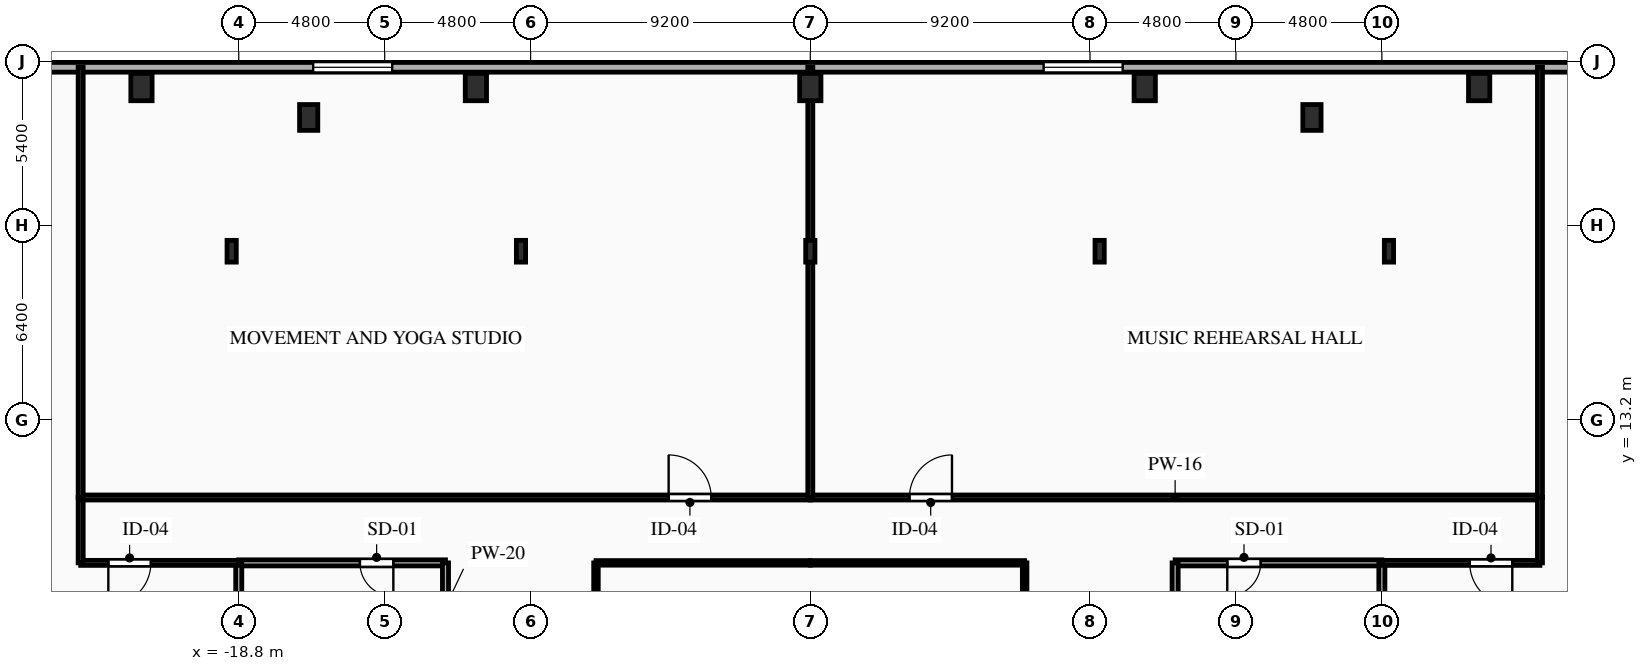
"""IFC4 building model, lengths in metres.
Left out: names, types, materials, properties, quantities, classifications, styles, units other than length and angle.
Written with IfcOpenShell. Run it as: python <this file> out.ifc"""

import sys

from ifc_helpers import new_model, si_unit, direction, frame, frame_2d, origin, origin_2d, place, context, subcontext, project, spatial, rectangle, i_section, extrude, element, fill, save


model = new_model("IFC4")
c1 = context("Model", 3, precision=1e-05, world=origin(), true_north=direction((0.0, 1.0)))
c2 = subcontext(c1, "Body", "Model", "MODEL_VIEW")
j1 = project(units=[si_unit("LENGTHUNIT", "METRE"), si_unit("PLANEANGLEUNIT", "RADIAN")], contexts=[c1])
p1 = place(None, origin())
s1 = spatial("IfcSite", under=j1, at=p1, CompositionType="ELEMENT")
p2 = place(p1, origin())
s2 = spatial("IfcBuilding", under=s1, at=p2, CompositionType="ELEMENT")
p3 = place(p2, frame((0.0, 0.0, 13.5)))
s3 = spatial("IfcBuildingStorey", under=s2, at=p3, CompositionType="ELEMENT", Elevation=13.5)
for number, where, z_axis, x_axis in (
    (1, (-22.0, 24.15, 0.0), (0.0, 0.0, 1.0), (1.0, 0.0, 0.0)),
    (2, (-11.0, 24.15, 0.0), (0.0, 0.0, 1.0), (1.0, 0.0, 0.0)),
    (3, (0.0, 24.15, 0.0), (0.0, 0.0, 1.0), (1.0, 0.0, 0.0)),
    (4, (11.0, 24.15, 0.0), (0.0, 0.0, 1.0), (1.0, 0.0, 0.0)),
    (5, (22.0, 24.15, 0.0), (0.0, 0.0, 1.0), (1.0, 0.0, 0.0)),
):
    element("IfcColumn", number, at=place(p3, frame(where, z_axis=z_axis, x_axis=x_axis)), inside=s3, PredefinedType="COLUMN", context=c2, shape_type="SweptSolid", body=[
        extrude(rectangle(XDim=0.7, YDim=0.9, at=origin_2d()), origin(), (0.0, 0.0, 1.0), 4.5),
    ])
for number, where, z_axis, x_axis in (
    (6, (-16.5, 23.15, 0.0), (0.0, 0.0, 1.0), (1.0, 0.0, 0.0)),
    (7, (16.5, 23.15, 0.0), (0.0, 0.0, 1.0), (1.0, 0.0, 0.0)),
):
    element("IfcColumn", number, at=place(p3, frame(where, z_axis=z_axis, x_axis=x_axis)), inside=s3, PredefinedType="PILASTER", context=c2, shape_type="SweptSolid", body=[
        extrude(rectangle(XDim=0.6, YDim=0.85, at=origin_2d()), origin(), (0.0, 0.0, 1.0), 4.5),
    ])
for number, where, z_axis, x_axis in (
    (8, (19.033, 18.75, 0.0), (0.0, 0.0, 1.0), (1.0, 0.0, 0.0)),
    (9, (9.517, 18.75, 0.0), (0.0, 0.0, 1.0), (1.0, 0.0, 0.0)),
    (10, (0.0, 18.75, 0.0), (0.0, 0.0, 1.0), (1.0, 0.0, 0.0)),
    (11, (-9.517, 18.75, 0.0), (0.0, 0.0, 1.0), (1.0, 0.0, 0.0)),
    (12, (-19.033, 18.75, 0.0), (0.0, 0.0, 1.0), (1.0, 0.0, 0.0)),
):
    element("IfcColumn", number, at=place(p3, frame(where, z_axis=z_axis, x_axis=x_axis)), inside=s3, PredefinedType="COLUMN", context=c2, shape_type="SweptSolid", body=[
        extrude(i_section(OverallWidth=0.304, OverallDepth=0.716, WebThickness=0.021, FlangeThickness=0.04, FilletRadius=0.027, at=origin_2d()), origin(), (0.0, 0.0, 1.0), 4.5),
    ])
p4 = place(p3, frame((-36.8, 24.8, 0.0), z_axis=(0.0, 0.0, 1.0), x_axis=(1.0, 0.0, 0.0)))
e13 = element("IfcWall", 13, at=p4, inside=s3, PredefinedType="SOLIDWALL", context=c2, shape_type="SweptSolid", body=[
    extrude(rectangle(XDim=73.6, YDim=0.32, at=frame_2d((36.8, 0.0))), origin(), (0.0, 0.0, 1.0), 4.17),
])
p5 = place(p4, frame((5.347, 0.0, 0.85)))
e14 = element("IfcOpeningElement", 14, at=p5, cuts=e13, PredefinedType="OPENING", context=c2, shape_type="SweptSolid", body=[
    extrude(rectangle(XDim=2.6, YDim=2.4, at=frame_2d((1.3, 1.2))), frame((0.0, 0.17, 0.0), z_axis=(0.0, -1.0, 0.0), x_axis=(1.0, 0.0, 0.0)), (0.0, 0.0, 1.0), 0.34),
])
p6 = place(p4, frame((20.448, 0.0, 0.85)))
e15 = element("IfcOpeningElement", 15, at=p6, cuts=e13, PredefinedType="OPENING", context=c2, shape_type="SweptSolid", body=[
    extrude(rectangle(XDim=2.6, YDim=2.4, at=frame_2d((1.3, 1.2))), frame((0.0, 0.17, 0.0), z_axis=(0.0, -1.0, 0.0), x_axis=(1.0, 0.0, 0.0)), (0.0, 0.0, 1.0), 0.34),
])
p7 = place(p4, frame((44.474, 0.0, 0.85)))
e16 = element("IfcOpeningElement", 16, at=p7, cuts=e13, PredefinedType="OPENING", context=c2, shape_type="SweptSolid", body=[
    extrude(rectangle(XDim=2.6, YDim=2.4, at=frame_2d((1.3, 1.2))), frame((0.0, 0.17, 0.0), z_axis=(0.0, -1.0, 0.0), x_axis=(1.0, 0.0, 0.0)), (0.0, 0.0, 1.0), 0.34),
])
p8 = place(p4, frame((65.733, 0.0, 0.85)))
e17 = element("IfcOpeningElement", 17, at=p8, cuts=e13, PredefinedType="OPENING", context=c2, shape_type="SweptSolid", body=[
    extrude(rectangle(XDim=2.6, YDim=2.4, at=frame_2d((1.3, 1.2))), frame((0.0, 0.17, 0.0), z_axis=(0.0, -1.0, 0.0), x_axis=(1.0, 0.0, 0.0)), (0.0, 0.0, 1.0), 0.34),
])
p9 = place(p3, frame((-12.0, 8.5, 0.0), z_axis=(0.0, 0.0, 1.0), x_axis=(-1.0, 0.0, 0.0)))
e18 = element("IfcWall", 18, at=p9, inside=s3, PredefinedType="PARTITIONING", context=c2, shape_type="SweptSolid", body=[
    extrude(rectangle(XDim=6.8, YDim=0.2, at=frame_2d((3.4, 0.0))), origin(), (0.0, 0.0, 1.0), 4.17),
])
p10 = place(p9, frame((1.715, 0.0, 0.0)))
e19 = element("IfcOpeningElement", 19, at=p10, cuts=e18, PredefinedType="OPENING", context=c2, shape_type="SweptSolid", body=[
    extrude(rectangle(XDim=1.1, YDim=2.15, at=frame_2d((0.55, 1.075))), frame((0.0, 0.11, 0.0), z_axis=(0.0, -1.0, 0.0), x_axis=(1.0, 0.0, 0.0)), (0.0, 0.0, 1.0), 0.22),
])
p11 = place(p3, frame((-12.0, 5.6, 0.0), z_axis=(0.0, 0.0, 1.0), x_axis=(0.0, 1.0, 0.0)))
e20 = element("IfcWall", 20, at=p11, inside=s3, PredefinedType="PARTITIONING", context=c2, shape_type="SweptSolid", body=[
    extrude(rectangle(XDim=2.9, YDim=0.2, at=frame_2d((1.45, 0.0))), origin(), (0.0, 0.0, 1.0), 4.17),
])
p12 = place(p3, frame((-18.8, 8.5, 0.0), z_axis=(0.0, 0.0, 1.0), x_axis=(0.0, -1.0, 0.0)))
e21 = element("IfcWall", 21, at=p12, inside=s3, PredefinedType="PARTITIONING", context=c2, shape_type="SweptSolid", body=[
    extrude(rectangle(XDim=2.9, YDim=0.2, at=frame_2d((1.45, 0.0))), origin(), (0.0, 0.0, 1.0), 3.655),
])
p13 = place(p3, frame((18.8, 8.5, 0.0), z_axis=(0.0, 0.0, 1.0), x_axis=(-1.0, 0.0, 0.0)))
e22 = element("IfcWall", 22, at=p13, inside=s3, PredefinedType="PARTITIONING", context=c2, shape_type="SweptSolid", body=[
    extrude(rectangle(XDim=6.8, YDim=0.2, at=frame_2d((3.4, 0.0))), origin(), (0.0, 0.0, 1.0), 4.17),
])
p14 = place(p13, frame((3.985, 0.0, 0.0)))
e23 = element("IfcOpeningElement", 23, at=p14, cuts=e22, PredefinedType="OPENING", context=c2, shape_type="SweptSolid", body=[
    extrude(rectangle(XDim=1.1, YDim=2.15, at=frame_2d((0.55, 1.075))), frame((0.0, 0.11, 0.0), z_axis=(0.0, -1.0, 0.0), x_axis=(1.0, 0.0, 0.0)), (0.0, 0.0, 1.0), 0.22),
])
p15 = place(p3, frame((12.0, 8.5, 0.0), z_axis=(0.0, 0.0, 1.0), x_axis=(0.0, -1.0, 0.0)))
e24 = element("IfcWall", 24, at=p15, inside=s3, PredefinedType="PARTITIONING", context=c2, shape_type="SweptSolid", body=[
    extrude(rectangle(XDim=2.9, YDim=0.2, at=frame_2d((1.45, 0.0))), origin(), (0.0, 0.0, 1.0), 4.17),
])
p16 = place(p3, frame((18.8, 5.6, 0.0), z_axis=(0.0, 0.0, 1.0), x_axis=(0.0, 1.0, 0.0)))
e25 = element("IfcWall", 25, at=p16, inside=s3, PredefinedType="PARTITIONING", context=c2, shape_type="SweptSolid", body=[
    extrude(rectangle(XDim=2.9, YDim=0.2, at=frame_2d((1.45, 0.0))), origin(), (0.0, 0.0, 1.0), 3.655),
])
p17 = place(p3, frame((-18.8, 8.5, 0.0), z_axis=(0.0, 0.0, 1.0), x_axis=(-1.0, 0.0, 0.0)))
e26 = element("IfcWall", 26, at=p17, inside=s3, PredefinedType="PARTITIONING", context=c2, shape_type="SweptSolid", body=[
    extrude(rectangle(XDim=5.2, YDim=0.165, at=frame_2d((2.6, 0.0))), origin(), (0.0, 0.0, 1.0), 4.17),
])
p18 = place(p17, frame((2.89, 0.0, 0.0)))
e27 = element("IfcOpeningElement", 27, at=p18, cuts=e26, PredefinedType="OPENING", context=c2, shape_type="SweptSolid", body=[
    extrude(rectangle(XDim=1.4, YDim=2.3, at=frame_2d((0.7, 1.15))), frame((0.0, 0.093, 0.0), z_axis=(0.0, -1.0, 0.0), x_axis=(1.0, 0.0, 0.0)), (0.0, 0.0, 1.0), 0.185),
])
p19 = place(p3, frame((-24.0, 8.5, 0.0), z_axis=(0.0, 0.0, 1.0), x_axis=(0.0, 1.0, 0.0)))
e28 = element("IfcWall", 28, at=p19, inside=s3, PredefinedType="PARTITIONING", context=c2, shape_type="SweptSolid", body=[
    extrude(rectangle(XDim=2.15, YDim=0.165, at=frame_2d((1.075, 0.0))), origin(), (0.0, 0.0, 1.0), 4.17),
])
p20 = place(p3, frame((-24.0, 10.65, 0.0), z_axis=(0.0, 0.0, 1.0), x_axis=(1.0, 0.0, 0.0)))
e29 = element("IfcWall", 29, at=p20, inside=s3, PredefinedType="PARTITIONING", context=c2, shape_type="SweptSolid", body=[
    extrude(rectangle(XDim=24.0, YDim=0.165, at=frame_2d((12.0, 0.0))), origin(), (0.0, 0.0, 1.0), 4.17),
])
p21 = place(p20, frame((19.34, 0.0, 0.0)))
e30 = element("IfcOpeningElement", 30, at=p21, cuts=e29, PredefinedType="OPENING", context=c2, shape_type="SweptSolid", body=[
    extrude(rectangle(XDim=1.4, YDim=2.3, at=frame_2d((0.7, 1.15))), frame((0.0, 0.093, 0.0), z_axis=(0.0, -1.0, 0.0), x_axis=(1.0, 0.0, 0.0)), (0.0, 0.0, 1.0), 0.185),
])
p22 = place(p3, frame((0.0, 8.5, 0.0), z_axis=(0.0, 0.0, 1.0), x_axis=(-1.0, 0.0, 0.0)))
e31 = element("IfcWall", 31, at=p22, inside=s3, PredefinedType="PARTITIONING", context=c2, shape_type="SweptSolid", body=[
    extrude(rectangle(XDim=7.05, YDim=0.15, at=frame_2d((3.525, 0.0))), origin(), (0.0, 0.0, 1.0), 4.17),
])
p23 = place(p3, frame((0.0, 10.65, 0.0), z_axis=(0.0, 0.0, 1.0), x_axis=(1.0, 0.0, 0.0)))
e32 = element("IfcWall", 32, at=p23, inside=s3, PredefinedType="PARTITIONING", context=c2, shape_type="SweptSolid", body=[
    extrude(rectangle(XDim=24.0, YDim=0.165, at=frame_2d((12.0, 0.0))), origin(), (0.0, 0.0, 1.0), 4.17),
])
p24 = place(p23, frame((3.26, 0.0, 0.0)))
e33 = element("IfcOpeningElement", 33, at=p24, cuts=e32, PredefinedType="OPENING", context=c2, shape_type="SweptSolid", body=[
    extrude(rectangle(XDim=1.4, YDim=2.3, at=frame_2d((0.7, 1.15))), frame((0.0, 0.093, 0.0), z_axis=(0.0, -1.0, 0.0), x_axis=(1.0, 0.0, 0.0)), (0.0, 0.0, 1.0), 0.185),
])
p25 = place(p3, frame((7.05, 8.5, 0.0), z_axis=(0.0, 0.0, 1.0), x_axis=(-1.0, 0.0, 0.0)))
e34 = element("IfcWall", 34, at=p25, inside=s3, PredefinedType="PARTITIONING", context=c2, shape_type="SweptSolid", body=[
    extrude(rectangle(XDim=7.05, YDim=0.15, at=frame_2d((3.525, 0.0))), origin(), (0.0, 0.0, 1.0), 4.17),
])
p26 = place(p3, frame((24.0, 8.5, 0.0), z_axis=(0.0, 0.0, 1.0), x_axis=(-1.0, 0.0, 0.0)))
e35 = element("IfcWall", 35, at=p26, inside=s3, PredefinedType="PARTITIONING", context=c2, shape_type="SweptSolid", body=[
    extrude(rectangle(XDim=5.2, YDim=0.165, at=frame_2d((2.6, 0.0))), origin(), (0.0, 0.0, 1.0), 4.17),
])
p27 = place(p26, frame((0.91, 0.0, 0.0)))
e36 = element("IfcOpeningElement", 36, at=p27, cuts=e35, PredefinedType="OPENING", context=c2, shape_type="SweptSolid", body=[
    extrude(rectangle(XDim=1.4, YDim=2.3, at=frame_2d((0.7, 1.15))), frame((0.0, 0.093, 0.0), z_axis=(0.0, -1.0, 0.0), x_axis=(1.0, 0.0, 0.0)), (0.0, 0.0, 1.0), 0.185),
])
p28 = place(p3, frame((24.0, 10.65, 0.0), z_axis=(0.0, 0.0, 1.0), x_axis=(0.0, -1.0, 0.0)))
e37 = element("IfcWall", 37, at=p28, inside=s3, PredefinedType="PARTITIONING", context=c2, shape_type="SweptSolid", body=[
    extrude(rectangle(XDim=2.15, YDim=0.165, at=frame_2d((1.075, 0.0))), origin(), (0.0, 0.0, 1.0), 4.17),
])
p29 = place(p3, frame((-7.05, 8.5, 0.0), z_axis=(0.0, 0.0, 1.0), x_axis=(0.0, -1.0, 0.0)))
e38 = element("IfcWall", 38, at=p29, inside=s3, PredefinedType="PARTITIONING", context=c2, shape_type="SweptSolid", body=[
    extrude(rectangle(XDim=14.1, YDim=0.15, at=frame_2d((7.05, 0.0))), origin(), (0.0, 0.0, 1.0), 4.17),
])
p30 = place(p29, frame((7.792, 0.0, 0.0)))
e39 = element("IfcOpeningElement", 39, at=p30, cuts=e38, PredefinedType="OPENING", context=c2, shape_type="SweptSolid", body=[
    extrude(rectangle(XDim=1.4, YDim=2.3, at=frame_2d((0.7, 1.15))), frame((0.0, 0.085, 0.0), z_axis=(0.0, -1.0, 0.0), x_axis=(1.0, 0.0, 0.0)), (0.0, 0.0, 1.0), 0.17),
])
p31 = place(p3, frame((7.05, -5.6, 0.0), z_axis=(0.0, 0.0, 1.0), x_axis=(0.0, 1.0, 0.0)))
e40 = element("IfcWall", 40, at=p31, inside=s3, PredefinedType="PARTITIONING", context=c2, shape_type="SweptSolid", body=[
    extrude(rectangle(XDim=14.1, YDim=0.15, at=frame_2d((7.05, 0.0))), origin(), (0.0, 0.0, 1.0), 4.17),
])
p32 = place(p3, frame((-24.0, 24.8, 0.0), z_axis=(0.0, 0.0, 1.0), x_axis=(0.0, -1.0, 0.0)))
e41 = element("IfcWall", 41, at=p32, inside=s3, PredefinedType="PARTITIONING", context=c2, shape_type="SweptSolid", body=[
    extrude(rectangle(XDim=14.15, YDim=0.165, at=frame_2d((7.075, 0.0))), origin(), (0.0, 0.0, 1.0), 4.17),
])
p33 = place(p3, frame((0.0, 24.8, 0.0), z_axis=(0.0, 0.0, 1.0), x_axis=(0.0, -1.0, 0.0)))
e42 = element("IfcWall", 42, at=p33, inside=s3, PredefinedType="PARTITIONING", context=c2, shape_type="SweptSolid", body=[
    extrude(rectangle(XDim=14.15, YDim=0.165, at=frame_2d((7.075, 0.0))), origin(), (0.0, 0.0, 1.0), 3.555),
])
p34 = place(p3, frame((24.0, 24.8, 0.0), z_axis=(0.0, 0.0, 1.0), x_axis=(0.0, -1.0, 0.0)))
e43 = element("IfcWall", 43, at=p34, inside=s3, PredefinedType="PARTITIONING", context=c2, shape_type="SweptSolid", body=[
    extrude(rectangle(XDim=14.15, YDim=0.165, at=frame_2d((7.075, 0.0))), origin(), (0.0, 0.0, 1.0), 4.17),
])
p35 = place(p6, origin())
e44 = element("IfcWindow", 44, at=p35, inside=s3, PartitioningType="SINGLE_PANEL", PredefinedType="WINDOW", context=c2, shape_type="SweptSolid", body=[
    extrude(rectangle(XDim=2.6, YDim=2.4, at=frame_2d((1.3, 1.2))), frame((0.0, 0.03, 0.0), z_axis=(0.0, -1.0, 0.0), x_axis=(1.0, 0.0, 0.0)), (0.0, 0.0, 1.0), 0.06),
])
fill(e15, e44)
p36 = place(p7, origin())
e45 = element("IfcWindow", 45, at=p36, inside=s3, PartitioningType="SINGLE_PANEL", PredefinedType="WINDOW", context=c2, shape_type="SweptSolid", body=[
    extrude(rectangle(XDim=2.6, YDim=2.4, at=frame_2d((1.3, 1.2))), frame((0.0, 0.03, 0.0), z_axis=(0.0, -1.0, 0.0), x_axis=(1.0, 0.0, 0.0)), (0.0, 0.0, 1.0), 0.06),
])
fill(e16, e45)
p37 = place(p10, origin())
e46 = element("IfcDoor", 46, at=p37, inside=s3, OperationType="SINGLE_SWING_LEFT", PredefinedType="DOOR", context=c2, shape_type="SweptSolid", body=[
    extrude(rectangle(XDim=1.1, YDim=2.15, at=frame_2d((0.55, 1.075))), frame((0.0, 0.025, 0.0), z_axis=(0.0, -1.0, 0.0), x_axis=(1.0, 0.0, 0.0)), (0.0, 0.0, 1.0), 0.05),
])
fill(e19, e46)
p38 = place(p14, origin())
e47 = element("IfcDoor", 47, at=p38, inside=s3, OperationType="SINGLE_SWING_RIGHT", PredefinedType="DOOR", context=c2, shape_type="SweptSolid", body=[
    extrude(rectangle(XDim=1.1, YDim=2.15, at=frame_2d((0.55, 1.075))), frame((0.0, 0.025, 0.0), z_axis=(0.0, -1.0, 0.0), x_axis=(1.0, 0.0, 0.0)), (0.0, 0.0, 1.0), 0.05),
])
fill(e23, e47)
p39 = place(p18, origin())
e48 = element("IfcDoor", 48, at=p39, inside=s3, OperationType="SINGLE_SWING_RIGHT", PredefinedType="DOOR", context=c2, shape_type="SweptSolid", body=[
    extrude(rectangle(XDim=1.4, YDim=2.3, at=frame_2d((0.7, 1.15))), frame((0.0, 0.025, 0.0), z_axis=(0.0, -1.0, 0.0), x_axis=(1.0, 0.0, 0.0)), (0.0, 0.0, 1.0), 0.05),
])
fill(e27, e48)
p40 = place(p21, origin())
e49 = element("IfcDoor", 49, at=p40, inside=s3, OperationType="SINGLE_SWING_LEFT", PredefinedType="DOOR", context=c2, shape_type="SweptSolid", body=[
    extrude(rectangle(XDim=1.4, YDim=2.3, at=frame_2d((0.7, 1.15))), frame((0.0, 0.025, 0.0), z_axis=(0.0, -1.0, 0.0), x_axis=(1.0, 0.0, 0.0)), (0.0, 0.0, 1.0), 0.05),
])
fill(e30, e49)
p41 = place(p24, origin())
e50 = element("IfcDoor", 50, at=p41, inside=s3, OperationType="SINGLE_SWING_RIGHT", PredefinedType="DOOR", context=c2, shape_type="SweptSolid", body=[
    extrude(rectangle(XDim=1.4, YDim=2.3, at=frame_2d((0.7, 1.15))), frame((0.0, 0.025, 0.0), z_axis=(0.0, -1.0, 0.0), x_axis=(1.0, 0.0, 0.0)), (0.0, 0.0, 1.0), 0.05),
])
fill(e33, e50)
p42 = place(p27, origin())
e51 = element("IfcDoor", 51, at=p42, inside=s3, OperationType="SINGLE_SWING_LEFT", PredefinedType="DOOR", context=c2, shape_type="SweptSolid", body=[
    extrude(rectangle(XDim=1.4, YDim=2.3, at=frame_2d((0.7, 1.15))), frame((0.0, 0.025, 0.0), z_axis=(0.0, -1.0, 0.0), x_axis=(1.0, 0.0, 0.0)), (0.0, 0.0, 1.0), 0.05),
])
fill(e36, e51)
save(model, sys.argv[1])
